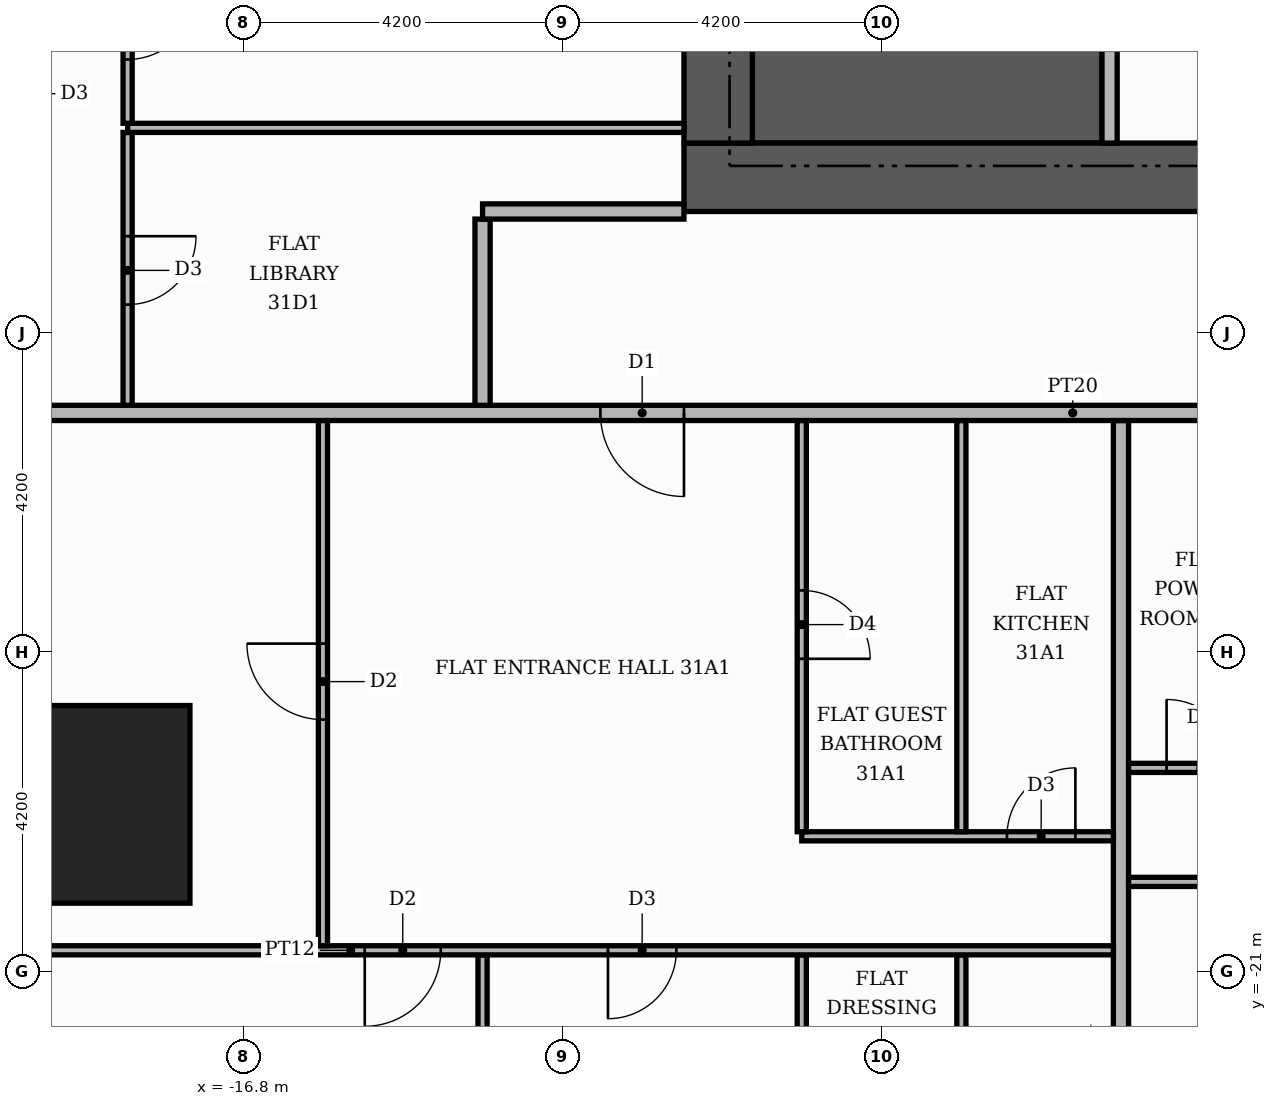
"""IFC4 building model, lengths in metres.
Left out: names, types, materials, properties, quantities, classifications, styles, units other than length and angle.
Written with IfcOpenShell. Run it as: python <this file> out.ifc"""

import sys

from ifc_helpers import new_model, si_unit, direction, frame, frame_2d, origin, origin_2d, place, context, subcontext, project, spatial, rectangle, extrude, element, fill, save


model = new_model("IFC4")
c1 = context("Model", 3, precision=1e-05, world=origin(), true_north=direction((0.0, 1.0)))
c2 = subcontext(c1, "Body", "Model", "MODEL_VIEW")
j1 = project(units=[si_unit("LENGTHUNIT", "METRE"), si_unit("PLANEANGLEUNIT", "RADIAN")], contexts=[c1])
p1 = place(None, origin())
s1 = spatial("IfcSite", under=j1, at=p1, CompositionType="ELEMENT")
p2 = place(p1, origin())
s2 = spatial("IfcBuilding", under=s1, at=p2, CompositionType="ELEMENT")
p3 = place(p2, frame((0.0, 0.0, 133.8)))
s3 = spatial("IfcBuildingStorey", under=s2, at=p3, CompositionType="ELEMENT", Elevation=133.8)
p4 = place(p3, frame((-10.1, -9.15, 0.0), z_axis=(0.0, 0.0, 1.0), x_axis=(1.0, 0.0, 0.0)))
e1 = element("IfcWall", 1, at=p4, inside=s3, PredefinedType="SHEAR", context=c2, shape_type="SweptSolid", body=[
    extrude(rectangle(XDim=4.6, YDim=1.9, at=frame_2d((2.3, 0.0))), origin(), (0.0, 0.0, 1.0), 3.48),
])
p5 = place(p3, frame((-11.0, -10.55, 0.0), z_axis=(0.0, 0.0, 1.0), x_axis=(1.0, 0.0, 0.0)))
e2 = element("IfcWall", 2, at=p5, inside=s3, PredefinedType="SHEAR", context=c2, shape_type="SweptSolid", body=[
    extrude(rectangle(XDim=22.0, YDim=0.9, at=frame_2d((11.0, 0.0))), origin(), (0.0, 0.0, 1.0), 3.48),
])
p6 = place(p5, frame((7.4, 0.0, 0.0)))
e3 = element("IfcOpeningElement", 3, at=p6, cuts=e2, PredefinedType="OPENING", context=c2, shape_type="SweptSolid", body=[
    extrude(rectangle(XDim=1.8, YDim=2.2, at=frame_2d((0.9, 1.1))), frame((0.0, 0.46, 0.0), z_axis=(0.0, -1.0, 0.0), x_axis=(1.0, 0.0, 0.0)), (0.0, 0.0, 1.0), 0.92),
])
p7 = place(p3, frame((-10.55, -10.1, 0.0), z_axis=(0.0, 0.0, 1.0), x_axis=(0.0, 1.0, 0.0)))
e4 = element("IfcWall", 4, at=p7, inside=s3, PredefinedType="SHEAR", context=c2, shape_type="SweptSolid", body=[
    extrude(rectangle(XDim=20.2, YDim=0.9, at=frame_2d((10.1, 0.0))), origin(), (0.0, 0.0, 1.0), 3.48),
])
p8 = place(p3, frame((-18.8, -18.8, 0.0), z_axis=(0.0, 0.0, 1.0), x_axis=(1.0, 0.0, 0.0)))
e5 = element("IfcColumn", 5, at=p8, inside=s3, PredefinedType="COLUMN", context=c2, shape_type="SweptSolid", body=[
    extrude(rectangle(XDim=2.6, YDim=2.6, at=origin_2d()), origin(), (0.0, 0.0, 1.0), 3.9),
])
p9 = place(p3, frame((-5.4, -10.1, 0.0), z_axis=(0.0, 0.0, 1.0), x_axis=(0.0, 1.0, 0.0)))
e6 = element("IfcWall", 6, at=p9, inside=s3, PredefinedType="PARTITIONING", context=c2, shape_type="SweptSolid", body=[
    extrude(rectangle(XDim=4.6, YDim=0.2, at=frame_2d((2.3, 0.0))), origin(), (0.0, 0.0, 1.0), 3.48),
])
p10 = place(p9, frame((2.9, 0.0, 0.0)))
e7 = element("IfcOpeningElement", 7, at=p10, cuts=e6, PredefinedType="OPENING", context=c2, shape_type="SweptSolid", body=[
    extrude(rectangle(XDim=1.0, YDim=2.1, at=frame_2d((0.5, 1.05))), frame((0.0, 0.11, 0.0), z_axis=(0.0, -1.0, 0.0), x_axis=(1.0, 0.0, 0.0)), (0.0, 0.0, 1.0), 0.22),
])
p11 = place(p3, frame((-13.65, -25.42, 0.0), z_axis=(0.0, 0.0, 1.0), x_axis=(0.0, 1.0, 0.0)))
e8 = element("IfcWall", 8, at=p11, inside=s3, PredefinedType="PARTITIONING", context=c2, shape_type="SweptSolid", body=[
    extrude(rectangle(XDim=4.64, YDim=0.12, at=frame_2d((2.32, 0.0))), origin(), (0.0, 0.0, 1.0), 3.48),
])
p12 = place(p3, frame((-9.45, -25.42, 0.0), z_axis=(0.0, 0.0, 1.0), x_axis=(0.0, 1.0, 0.0)))
e9 = element("IfcWall", 9, at=p12, inside=s3, PredefinedType="PARTITIONING", context=c2, shape_type="SweptSolid", body=[
    extrude(rectangle(XDim=4.64, YDim=0.12, at=frame_2d((2.32, 0.0))), origin(), (0.0, 0.0, 1.0), 3.48),
])
p13 = place(p12, frame((1.75, 0.0, 0.0)))
e10 = element("IfcOpeningElement", 10, at=p13, cuts=e9, PredefinedType="OPENING", context=c2, shape_type="SweptSolid", body=[
    extrude(rectangle(XDim=0.9, YDim=2.1, at=frame_2d((0.45, 1.05))), frame((0.0, 0.07, 0.0), z_axis=(0.0, -1.0, 0.0), x_axis=(1.0, 0.0, 0.0)), (0.0, 0.0, 1.0), 0.14),
])
p14 = place(p3, frame((-7.35, -25.42, 0.0), z_axis=(0.0, 0.0, 1.0), x_axis=(0.0, 1.0, 0.0)))
e11 = element("IfcWall", 11, at=p14, inside=s3, PredefinedType="PARTITIONING", context=c2, shape_type="SweptSolid", body=[
    extrude(rectangle(XDim=4.64, YDim=0.12, at=frame_2d((2.32, 0.0))), origin(), (0.0, 0.0, 1.0), 3.48),
])
p15 = place(p14, frame((1.75, 0.0, 0.0)))
e12 = element("IfcOpeningElement", 12, at=p15, cuts=e11, PredefinedType="OPENING", context=c2, shape_type="SweptSolid", body=[
    extrude(rectangle(XDim=0.9, YDim=2.1, at=frame_2d((0.45, 1.05))), frame((0.0, 0.07, 0.0), z_axis=(0.0, -1.0, 0.0), x_axis=(1.0, 0.0, 0.0)), (0.0, 0.0, 1.0), 0.14),
])
p16 = place(p3, frame((-5.25, -25.42, 0.0), z_axis=(0.0, 0.0, 1.0), x_axis=(0.0, 1.0, 0.0)))
e13 = element("IfcWall", 13, at=p16, inside=s3, PredefinedType="PARTITIONING", context=c2, shape_type="SweptSolid", body=[
    extrude(rectangle(XDim=11.67, YDim=0.2, at=frame_2d((5.835, 0.0))), origin(), (0.0, 0.0, 1.0), 3.48),
])
p17 = place(p3, frame((-25.42, -20.72, 0.0), z_axis=(0.0, 0.0, 1.0), x_axis=(1.0, 0.0, 0.0)))
e14 = element("IfcWall", 14, at=p17, inside=s3, PredefinedType="PARTITIONING", context=c2, shape_type="SweptSolid", body=[
    extrude(rectangle(XDim=20.07, YDim=0.12, at=frame_2d((10.035, 0.0))), origin(), (0.0, 0.0, 1.0), 3.48),
])
p18 = place(p17, frame((10.22, 0.0, 0.0)))
e15 = element("IfcOpeningElement", 15, at=p18, cuts=e14, PredefinedType="OPENING", context=c2, shape_type="SweptSolid", body=[
    extrude(rectangle(XDim=1.0, YDim=2.1, at=frame_2d((0.5, 1.05))), frame((0.0, 0.07, 0.0), z_axis=(0.0, -1.0, 0.0), x_axis=(1.0, 0.0, 0.0)), (0.0, 0.0, 1.0), 0.14),
])
p19 = place(p17, frame((13.42, 0.0, 0.0)))
e16 = element("IfcOpeningElement", 16, at=p19, cuts=e14, PredefinedType="OPENING", context=c2, shape_type="SweptSolid", body=[
    extrude(rectangle(XDim=0.9, YDim=2.1, at=frame_2d((0.45, 1.05))), frame((0.0, 0.07, 0.0), z_axis=(0.0, -1.0, 0.0), x_axis=(1.0, 0.0, 0.0)), (0.0, 0.0, 1.0), 0.14),
])
p20 = place(p3, frame((-15.75, -20.66, 0.0), z_axis=(0.0, 0.0, 1.0), x_axis=(0.0, 1.0, 0.0)))
e17 = element("IfcWall", 17, at=p20, inside=s3, PredefinedType="PARTITIONING", context=c2, shape_type="SweptSolid", body=[
    extrude(rectangle(XDim=6.91, YDim=0.12, at=frame_2d((3.455, 0.0))), origin(), (0.0, 0.0, 1.0), 3.48),
])
p21 = place(p20, frame((2.975, 0.0, 0.0)))
e18 = element("IfcOpeningElement", 18, at=p21, cuts=e17, PredefinedType="OPENING", context=c2, shape_type="SweptSolid", body=[
    extrude(rectangle(XDim=1.0, YDim=2.1, at=frame_2d((0.5, 1.05))), frame((0.0, 0.07, 0.0), z_axis=(0.0, -1.0, 0.0), x_axis=(1.0, 0.0, 0.0)), (0.0, 0.0, 1.0), 0.14),
])
p22 = place(p3, frame((-5.15, -19.82, 0.0), z_axis=(0.0, 0.0, 1.0), x_axis=(1.0, 0.0, 0.0)))
e19 = element("IfcWall", 19, at=p22, inside=s3, PredefinedType="PARTITIONING", context=c2, shape_type="SweptSolid", body=[
    extrude(rectangle(XDim=18.7, YDim=0.12, at=frame_2d((9.35, 0.0))), origin(), (0.0, 0.0, 1.0), 3.48),
])
p23 = place(p22, frame((2.55, 0.0, 0.0)))
e20 = element("IfcOpeningElement", 20, at=p23, cuts=e19, PredefinedType="OPENING", context=c2, shape_type="SweptSolid", body=[
    extrude(rectangle(XDim=1.0, YDim=2.1, at=frame_2d((0.5, 1.05))), frame((0.0, 0.07, 0.0), z_axis=(0.0, -1.0, 0.0), x_axis=(1.0, 0.0, 0.0)), (0.0, 0.0, 1.0), 0.14),
])
p24 = place(p22, frame((7.85, 0.0, 0.0)))
e21 = element("IfcOpeningElement", 21, at=p24, cuts=e19, PredefinedType="OPENING", context=c2, shape_type="SweptSolid", body=[
    extrude(rectangle(XDim=0.9, YDim=2.1, at=frame_2d((0.45, 1.05))), frame((0.0, 0.07, 0.0), z_axis=(0.0, -1.0, 0.0), x_axis=(1.0, 0.0, 0.0)), (0.0, 0.0, 1.0), 0.14),
])
p25 = place(p22, frame((16.25, 0.0, 0.0)))
e22 = element("IfcOpeningElement", 22, at=p25, cuts=e19, PredefinedType="OPENING", context=c2, shape_type="SweptSolid", body=[
    extrude(rectangle(XDim=0.9, YDim=2.1, at=frame_2d((0.45, 1.05))), frame((0.0, 0.07, 0.0), z_axis=(0.0, -1.0, 0.0), x_axis=(1.0, 0.0, 0.0)), (0.0, 0.0, 1.0), 0.14),
])
p26 = place(p3, frame((-9.45, -19.22, 0.0), z_axis=(0.0, 0.0, 1.0), x_axis=(1.0, 0.0, 0.0)))
e23 = element("IfcWall", 23, at=p26, inside=s3, PredefinedType="PARTITIONING", context=c2, shape_type="SweptSolid", body=[
    extrude(rectangle(XDim=4.1, YDim=0.12, at=frame_2d((2.05, 0.0))), origin(), (0.0, 0.0, 1.0), 3.48),
])
p27 = place(p26, frame((2.7, 0.0, 0.0)))
e24 = element("IfcOpeningElement", 24, at=p27, cuts=e23, PredefinedType="OPENING", context=c2, shape_type="SweptSolid", body=[
    extrude(rectangle(XDim=0.9, YDim=2.1, at=frame_2d((0.45, 1.05))), frame((0.0, 0.07, 0.0), z_axis=(0.0, -1.0, 0.0), x_axis=(1.0, 0.0, 0.0)), (0.0, 0.0, 1.0), 0.14),
])
p28 = place(p3, frame((-9.45, -19.16, 0.0), z_axis=(0.0, 0.0, 1.0), x_axis=(0.0, 1.0, 0.0)))
e25 = element("IfcWall", 25, at=p28, inside=s3, PredefinedType="PARTITIONING", context=c2, shape_type="SweptSolid", body=[
    extrude(rectangle(XDim=5.41, YDim=0.12, at=frame_2d((2.705, 0.0))), origin(), (0.0, 0.0, 1.0), 3.48),
])
p29 = place(p28, frame((2.275, 0.0, 0.0)))
e26 = element("IfcOpeningElement", 26, at=p29, cuts=e25, PredefinedType="OPENING", context=c2, shape_type="SweptSolid", body=[
    extrude(rectangle(XDim=0.9, YDim=2.1, at=frame_2d((0.45, 1.05))), frame((0.0, 0.07, 0.0), z_axis=(0.0, -1.0, 0.0), x_axis=(1.0, 0.0, 0.0)), (0.0, 0.0, 1.0), 0.14),
])
p30 = place(p3, frame((-7.35, -19.16, 0.0), z_axis=(0.0, 0.0, 1.0), x_axis=(0.0, 1.0, 0.0)))
e27 = element("IfcWall", 27, at=p30, inside=s3, PredefinedType="PARTITIONING", context=c2, shape_type="SweptSolid", body=[
    extrude(rectangle(XDim=5.41, YDim=0.12, at=frame_2d((2.705, 0.0))), origin(), (0.0, 0.0, 1.0), 3.48),
])
p31 = place(p3, frame((-5.15, -18.32, 0.0), z_axis=(0.0, 0.0, 1.0), x_axis=(1.0, 0.0, 0.0)))
e28 = element("IfcWall", 28, at=p31, inside=s3, PredefinedType="PARTITIONING", context=c2, shape_type="SweptSolid", body=[
    extrude(rectangle(XDim=4.1, YDim=0.12, at=frame_2d((2.05, 0.0))), origin(), (0.0, 0.0, 1.0), 3.48),
])
p32 = place(p31, frame((0.5, 0.0, 0.0)))
e29 = element("IfcOpeningElement", 29, at=p32, cuts=e28, PredefinedType="OPENING", context=c2, shape_type="SweptSolid", body=[
    extrude(rectangle(XDim=0.9, YDim=2.1, at=frame_2d((0.45, 1.05))), frame((0.0, 0.07, 0.0), z_axis=(0.0, -1.0, 0.0), x_axis=(1.0, 0.0, 0.0)), (0.0, 0.0, 1.0), 0.14),
])
p33 = place(p3, frame((-25.42, -13.65, 0.0), z_axis=(0.0, 0.0, 1.0), x_axis=(1.0, 0.0, 0.0)))
e30 = element("IfcWall", 30, at=p33, inside=s3, PredefinedType="PARTITIONING", context=c2, shape_type="SweptSolid", body=[
    extrude(rectangle(XDim=39.07, YDim=0.2, at=frame_2d((19.535, 0.0))), origin(), (0.0, 0.0, 1.0), 3.48),
])
p34 = place(p33, frame((13.32, 0.0, 0.0)))
e31 = element("IfcOpeningElement", 31, at=p34, cuts=e30, PredefinedType="OPENING", context=c2, shape_type="SweptSolid", body=[
    extrude(rectangle(XDim=1.1, YDim=2.4, at=frame_2d((0.55, 1.2))), frame((0.0, 0.11, 0.0), z_axis=(0.0, -1.0, 0.0), x_axis=(1.0, 0.0, 0.0)), (0.0, 0.0, 1.0), 0.22),
])
p35 = place(p33, frame((25.92, 0.0, 0.0)))
e32 = element("IfcOpeningElement", 32, at=p35, cuts=e30, PredefinedType="OPENING", context=c2, shape_type="SweptSolid", body=[
    extrude(rectangle(XDim=1.1, YDim=2.4, at=frame_2d((0.55, 1.2))), frame((0.0, 0.11, 0.0), z_axis=(0.0, -1.0, 0.0), x_axis=(1.0, 0.0, 0.0)), (0.0, 0.0, 1.0), 0.22),
])
p36 = place(p3, frame((-18.32, -13.55, 0.0), z_axis=(0.0, 0.0, 1.0), x_axis=(0.0, 1.0, 0.0)))
e33 = element("IfcWall", 33, at=p36, inside=s3, PredefinedType="PARTITIONING", context=c2, shape_type="SweptSolid", body=[
    extrude(rectangle(XDim=3.59, YDim=0.12, at=frame_2d((1.795, 0.0))), origin(), (0.0, 0.0, 1.0), 3.48),
])
p37 = place(p36, frame((1.325, 0.0, 0.0)))
e34 = element("IfcOpeningElement", 34, at=p37, cuts=e33, PredefinedType="OPENING", context=c2, shape_type="SweptSolid", body=[
    extrude(rectangle(XDim=0.9, YDim=2.1, at=frame_2d((0.45, 1.05))), frame((0.0, 0.07, 0.0), z_axis=(0.0, -1.0, 0.0), x_axis=(1.0, 0.0, 0.0)), (0.0, 0.0, 1.0), 0.14),
])
p38 = place(p3, frame((-13.65, -13.55, 0.0), z_axis=(0.0, 0.0, 1.0), x_axis=(0.0, 1.0, 0.0)))
e35 = element("IfcWall", 35, at=p38, inside=s3, PredefinedType="PARTITIONING", context=c2, shape_type="SweptSolid", body=[
    extrude(rectangle(XDim=2.45, YDim=0.2, at=frame_2d((1.225, 0.0))), origin(), (0.0, 0.0, 1.0), 3.48),
])
p39 = place(p3, frame((-13.65, -11.0, 0.0), z_axis=(0.0, 0.0, 1.0), x_axis=(1.0, 0.0, 0.0)))
e36 = element("IfcWall", 36, at=p39, inside=s3, PredefinedType="PARTITIONING", context=c2, shape_type="SweptSolid", body=[
    extrude(rectangle(XDim=2.65, YDim=0.2, at=frame_2d((1.325, 0.0))), origin(), (0.0, 0.0, 1.0), 3.48),
])
p40 = place(p3, frame((-18.32, -9.9, 0.0), z_axis=(0.0, 0.0, 1.0), x_axis=(1.0, 0.0, 0.0)))
e37 = element("IfcWall", 37, at=p40, inside=s3, PredefinedType="PARTITIONING", context=c2, shape_type="SweptSolid", body=[
    extrude(rectangle(XDim=7.32, YDim=0.12, at=frame_2d((3.66, 0.0))), origin(), (0.0, 0.0, 1.0), 3.48),
])
p41 = place(p3, frame((-18.32, -9.84, 0.0), z_axis=(0.0, 0.0, 1.0), x_axis=(0.0, 1.0, 0.0)))
e38 = element("IfcWall", 38, at=p41, inside=s3, PredefinedType="PARTITIONING", context=c2, shape_type="SweptSolid", body=[
    extrude(rectangle(XDim=2.58, YDim=0.12, at=frame_2d((1.29, 0.0))), origin(), (0.0, 0.0, 1.0), 3.48),
])
p42 = place(p41, frame((0.84, 0.0, 0.0)))
e39 = element("IfcOpeningElement", 39, at=p42, cuts=e38, PredefinedType="OPENING", context=c2, shape_type="SweptSolid", body=[
    extrude(rectangle(XDim=0.9, YDim=2.1, at=frame_2d((0.45, 1.05))), frame((0.0, 0.07, 0.0), z_axis=(0.0, -1.0, 0.0), x_axis=(1.0, 0.0, 0.0)), (0.0, 0.0, 1.0), 0.14),
])
p43 = place(p34, frame((1.1, 0.0, 0.0), z_axis=(0.0, 0.0, 1.0), x_axis=(-1.0, 0.0, 0.0)))
e40 = element("IfcDoor", 40, at=p43, inside=s3, OperationType="SINGLE_SWING_RIGHT", PredefinedType="DOOR", context=c2, shape_type="SweptSolid", body=[
    extrude(rectangle(XDim=1.1, YDim=2.4, at=frame_2d((0.55, 1.2))), frame((0.0, 0.025, 0.0), z_axis=(0.0, -1.0, 0.0), x_axis=(1.0, 0.0, 0.0)), (0.0, 0.0, 1.0), 0.05),
])
fill(e31, e40)
p44 = place(p21, origin())
e41 = element("IfcDoor", 41, at=p44, inside=s3, OperationType="SINGLE_SWING_RIGHT", PredefinedType="DOOR", context=c2, shape_type="SweptSolid", body=[
    extrude(rectangle(XDim=1.0, YDim=2.1, at=frame_2d((0.5, 1.05))), frame((0.0, 0.025, 0.0), z_axis=(0.0, -1.0, 0.0), x_axis=(1.0, 0.0, 0.0)), (0.0, 0.0, 1.0), 0.05),
])
fill(e18, e41)
p45 = place(p29, frame((0.9, 0.0, 0.0), z_axis=(0.0, 0.0, 1.0), x_axis=(-1.0, 0.0, 0.0)))
e42 = element("IfcDoor", 42, at=p45, inside=s3, OperationType="SINGLE_SWING_LEFT", PredefinedType="DOOR", context=c2, shape_type="SweptSolid", body=[
    extrude(rectangle(XDim=0.9, YDim=2.1, at=frame_2d((0.45, 1.05))), frame((0.0, 0.025, 0.0), z_axis=(0.0, -1.0, 0.0), x_axis=(1.0, 0.0, 0.0)), (0.0, 0.0, 1.0), 0.05),
])
fill(e26, e42)
p46 = place(p27, origin())
e43 = element("IfcDoor", 43, at=p46, inside=s3, OperationType="SINGLE_SWING_RIGHT", PredefinedType="DOOR", context=c2, shape_type="SweptSolid", body=[
    extrude(rectangle(XDim=0.9, YDim=2.1, at=frame_2d((0.45, 1.05))), frame((0.0, 0.025, 0.0), z_axis=(0.0, -1.0, 0.0), x_axis=(1.0, 0.0, 0.0)), (0.0, 0.0, 1.0), 0.05),
])
fill(e24, e43)
p47 = place(p18, frame((1.0, 0.0, 0.0), z_axis=(0.0, 0.0, 1.0), x_axis=(-1.0, 0.0, 0.0)))
e44 = element("IfcDoor", 44, at=p47, inside=s3, OperationType="SINGLE_SWING_LEFT", PredefinedType="DOOR", context=c2, shape_type="SweptSolid", body=[
    extrude(rectangle(XDim=1.0, YDim=2.1, at=frame_2d((0.5, 1.05))), frame((0.0, 0.025, 0.0), z_axis=(0.0, -1.0, 0.0), x_axis=(1.0, 0.0, 0.0)), (0.0, 0.0, 1.0), 0.05),
])
fill(e15, e44)
p48 = place(p19, frame((0.9, 0.0, 0.0), z_axis=(0.0, 0.0, 1.0), x_axis=(-1.0, 0.0, 0.0)))
e45 = element("IfcDoor", 45, at=p48, inside=s3, OperationType="SINGLE_SWING_LEFT", PredefinedType="DOOR", context=c2, shape_type="SweptSolid", body=[
    extrude(rectangle(XDim=0.9, YDim=2.1, at=frame_2d((0.45, 1.05))), frame((0.0, 0.025, 0.0), z_axis=(0.0, -1.0, 0.0), x_axis=(1.0, 0.0, 0.0)), (0.0, 0.0, 1.0), 0.05),
])
fill(e16, e45)
p49 = place(p32, origin())
e46 = element("IfcDoor", 46, at=p49, inside=s3, OperationType="SINGLE_SWING_LEFT", PredefinedType="DOOR", context=c2, shape_type="SweptSolid", body=[
    extrude(rectangle(XDim=0.9, YDim=2.1, at=frame_2d((0.45, 1.05))), frame((0.0, 0.025, 0.0), z_axis=(0.0, -1.0, 0.0), x_axis=(1.0, 0.0, 0.0)), (0.0, 0.0, 1.0), 0.05),
])
fill(e29, e46)
p50 = place(p42, frame((0.9, 0.0, 0.0), z_axis=(0.0, 0.0, 1.0), x_axis=(-1.0, 0.0, 0.0)))
e47 = element("IfcDoor", 47, at=p50, inside=s3, OperationType="SINGLE_SWING_RIGHT", PredefinedType="DOOR", context=c2, shape_type="SweptSolid", body=[
    extrude(rectangle(XDim=0.9, YDim=2.1, at=frame_2d((0.45, 1.05))), frame((0.0, 0.025, 0.0), z_axis=(0.0, -1.0, 0.0), x_axis=(1.0, 0.0, 0.0)), (0.0, 0.0, 1.0), 0.05),
])
fill(e39, e47)
p51 = place(p37, frame((0.9, 0.0, 0.0), z_axis=(0.0, 0.0, 1.0), x_axis=(-1.0, 0.0, 0.0)))
e48 = element("IfcDoor", 48, at=p51, inside=s3, OperationType="SINGLE_SWING_RIGHT", PredefinedType="DOOR", context=c2, shape_type="SweptSolid", body=[
    extrude(rectangle(XDim=0.9, YDim=2.1, at=frame_2d((0.45, 1.05))), frame((0.0, 0.025, 0.0), z_axis=(0.0, -1.0, 0.0), x_axis=(1.0, 0.0, 0.0)), (0.0, 0.0, 1.0), 0.05),
])
fill(e34, e48)
save(model, sys.argv[1])
